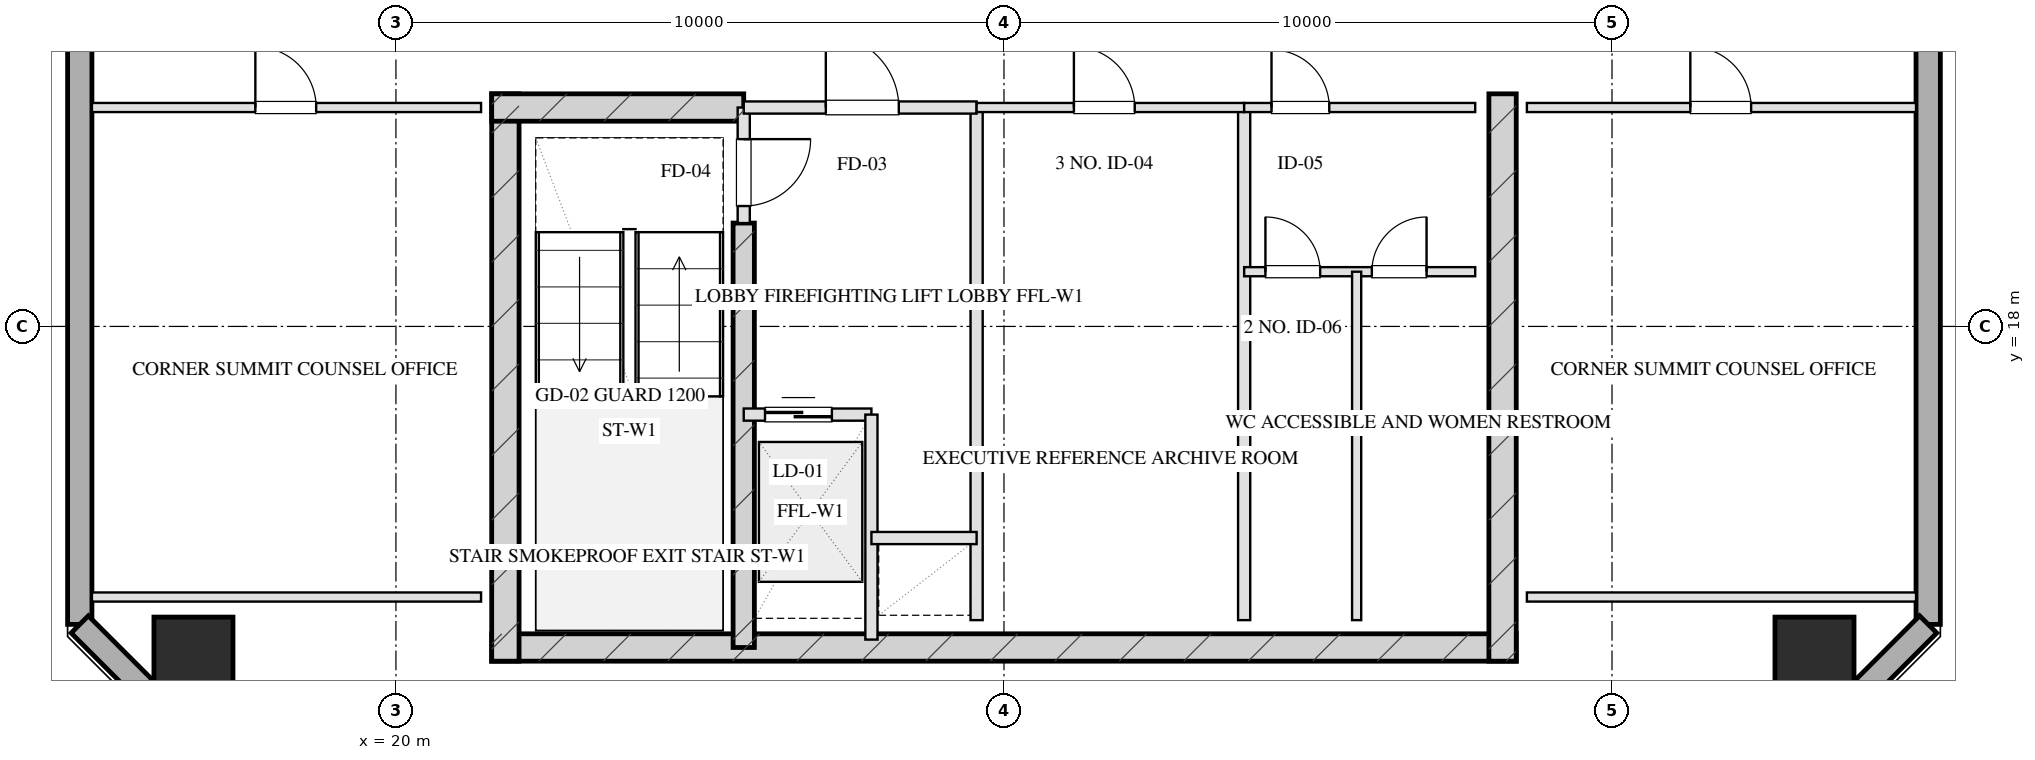
"""IFC4 building model, lengths in metres.
Left out: names, types, materials, properties, quantities, classifications, styles, units other than length and angle.
Written with IfcOpenShell. Run it as: python <this file> out.ifc"""

import sys

from ifc_helpers import new_model, si_unit, direction, frame, frame_2d, origin, origin_2d, place, context, subcontext, project, spatial, rectangle, hollow_rectangle, extrude, element, fill, save


model = new_model("IFC4")
c1 = context("Model", 3, precision=1e-05, world=origin(), true_north=direction((0.0, 1.0)))
c2 = subcontext(c1, "Body", "Model", "MODEL_VIEW")
j1 = project(units=[si_unit("LENGTHUNIT", "METRE"), si_unit("PLANEANGLEUNIT", "RADIAN")], contexts=[c1])
p1 = place(None, origin())
s1 = spatial("IfcSite", under=j1, at=p1, CompositionType="ELEMENT")
p2 = place(p1, origin())
s2 = spatial("IfcBuilding", under=s1, at=p2, CompositionType="ELEMENT")
p3 = place(p2, frame((0.0, 0.0, 263.2)))
s3 = spatial("IfcBuildingStorey", under=s2, at=p3, CompositionType="ELEMENT", Elevation=263.2)
p4 = place(p3, frame((21.575, 12.72, 0.0), z_axis=(0.0, 0.0, 1.0), x_axis=(1.0, 0.0, 0.0)))
e1 = element("IfcWall", 1, at=p4, inside=s3, PredefinedType="SHEAR", context=c2, shape_type="SweptSolid", body=[
    extrude(rectangle(XDim=16.85, YDim=0.45, at=frame_2d((8.425, 0.0))), origin(), (0.0, 0.0, 1.0), 3.2),
])
for number, where, z_axis, x_axis in (
    (2, (21.8, 21.825, 0.0), (0.0, 0.0, 1.0), (0.0, -1.0, 0.0)),
    (3, (38.2, 21.825, 0.0), (0.0, 0.0, 1.0), (0.0, -1.0, 0.0)),
):
    element("IfcWall", number, at=place(p3, frame(where, z_axis=z_axis, x_axis=x_axis)), inside=s3, PredefinedType="SHEAR", context=c2, shape_type="SweptSolid", body=[
        extrude(rectangle(XDim=9.33, YDim=0.45, at=frame_2d((4.665, 0.0))), origin(), (0.0, 0.0, 1.0), 3.2),
    ])
p5 = place(p3, frame((25.72, 19.7, 0.0), z_axis=(0.0, 0.0, 1.0), x_axis=(0.0, -1.0, 0.0)))
e4 = element("IfcWall", 4, at=p5, inside=s3, PredefinedType="SHEAR", context=c2, shape_type="SweptSolid", body=[
    extrude(rectangle(XDim=6.98, YDim=0.35, at=frame_2d((3.49, 0.0))), origin(), (0.0, 0.0, 1.0), 3.2),
])
p6 = place(p3, frame((21.575, 21.6, 0.0), z_axis=(0.0, 0.0, 1.0), x_axis=(1.0, 0.0, 0.0)))
e5 = element("IfcWall", 5, at=p6, inside=s3, PredefinedType="SHEAR", context=c2, shape_type="SweptSolid", body=[
    extrude(rectangle(XDim=4.145, YDim=0.45, at=frame_2d((2.073, 0.0))), origin(), (0.0, 0.0, 1.0), 3.2),
])
for number, where, z_axis, x_axis in (
    (6, (16.67, 12.57, 0.0), (0.0, 0.0, 1.0), (1.0, 0.0, 0.0)),
    (7, (43.33, 12.57, 0.0), (0.0, 0.0, 1.0), (1.0, 0.0, 0.0)),
):
    element("IfcColumn", number, at=place(p3, frame(where, z_axis=z_axis, x_axis=x_axis)), inside=s3, PredefinedType="COLUMN", context=c2, shape_type="SweptSolid", body=[
        extrude(hollow_rectangle(XDim=1.3, YDim=1.3, WallThickness=0.045, at=origin_2d()), origin(), (0.0, 0.0, 1.0), 3.201),
    ])
p7 = place(p3, frame((14.8, 13.1, 0.0), z_axis=(0.0, 0.0, 1.0), x_axis=(0.0, 1.0, 0.0)))
e8 = element("IfcWall", 8, at=p7, inside=s3, PredefinedType="SOLIDWALL", context=c2, shape_type="SweptSolid", body=[
    extrude(rectangle(XDim=41.8, YDim=0.4, at=frame_2d((20.9, 0.0))), origin(), (0.0, 0.0, 1.0), 2.36),
])
p8 = place(p7, frame((13.525, 0.0, 0.75)))
e9 = element("IfcOpeningElement", 9, at=p8, cuts=e8, PredefinedType="OPENING", context=c2, shape_type="SweptSolid", body=[
    extrude(rectangle(XDim=1.95, YDim=1.21, at=frame_2d((0.975, 0.605))), frame((0.0, 0.21, 0.0), z_axis=(0.0, -1.0, 0.0), x_axis=(1.0, 0.0, 0.0)), (0.0, 0.0, 1.0), 0.42),
])
p9 = place(p7, frame((17.325, 0.0, 0.75)))
e10 = element("IfcOpeningElement", 10, at=p9, cuts=e8, PredefinedType="OPENING", context=c2, shape_type="SweptSolid", body=[
    extrude(rectangle(XDim=1.95, YDim=1.21, at=frame_2d((0.975, 0.605))), frame((0.0, 0.21, 0.0), z_axis=(0.0, -1.0, 0.0), x_axis=(1.0, 0.0, 0.0)), (0.0, 0.0, 1.0), 0.42),
])
p10 = place(p7, frame((22.525, 0.0, 0.75)))
e11 = element("IfcOpeningElement", 11, at=p10, cuts=e8, PredefinedType="OPENING", context=c2, shape_type="SweptSolid", body=[
    extrude(rectangle(XDim=1.95, YDim=1.21, at=frame_2d((0.975, 0.605))), frame((0.0, 0.21, 0.0), z_axis=(0.0, -1.0, 0.0), x_axis=(1.0, 0.0, 0.0)), (0.0, 0.0, 1.0), 0.42),
])
p11 = place(p7, frame((26.325, 0.0, 0.75)))
e12 = element("IfcOpeningElement", 12, at=p11, cuts=e8, PredefinedType="OPENING", context=c2, shape_type="SweptSolid", body=[
    extrude(rectangle(XDim=1.95, YDim=1.21, at=frame_2d((0.975, 0.605))), frame((0.0, 0.21, 0.0), z_axis=(0.0, -1.0, 0.0), x_axis=(1.0, 0.0, 0.0)), (0.0, 0.0, 1.0), 0.42),
])
p12 = place(p3, frame((45.2, 54.9, 0.0), z_axis=(0.0, 0.0, 1.0), x_axis=(0.0, -1.0, 0.0)))
e13 = element("IfcWall", 13, at=p12, inside=s3, PredefinedType="SOLIDWALL", context=c2, shape_type="SweptSolid", body=[
    extrude(rectangle(XDim=41.8, YDim=0.4, at=frame_2d((20.9, 0.0))), origin(), (0.0, 0.0, 1.0), 2.36),
])
p13 = place(p12, frame((26.325, 0.0, 0.75)))
e14 = element("IfcOpeningElement", 14, at=p13, cuts=e13, PredefinedType="OPENING", context=c2, shape_type="SweptSolid", body=[
    extrude(rectangle(XDim=1.95, YDim=1.21, at=frame_2d((0.975, 0.605))), frame((0.0, 0.21, 0.0), z_axis=(0.0, -1.0, 0.0), x_axis=(1.0, 0.0, 0.0)), (0.0, 0.0, 1.0), 0.42),
])
p14 = place(p12, frame((22.525, 0.0, 0.75)))
e15 = element("IfcOpeningElement", 15, at=p14, cuts=e13, PredefinedType="OPENING", context=c2, shape_type="SweptSolid", body=[
    extrude(rectangle(XDim=1.95, YDim=1.21, at=frame_2d((0.975, 0.605))), frame((0.0, 0.21, 0.0), z_axis=(0.0, -1.0, 0.0), x_axis=(1.0, 0.0, 0.0)), (0.0, 0.0, 1.0), 0.42),
])
p15 = place(p12, frame((17.325, 0.0, 0.75)))
e16 = element("IfcOpeningElement", 16, at=p15, cuts=e13, PredefinedType="OPENING", context=c2, shape_type="SweptSolid", body=[
    extrude(rectangle(XDim=1.95, YDim=1.21, at=frame_2d((0.975, 0.605))), frame((0.0, 0.21, 0.0), z_axis=(0.0, -1.0, 0.0), x_axis=(1.0, 0.0, 0.0)), (0.0, 0.0, 1.0), 0.42),
])
p16 = place(p12, frame((13.525, 0.0, 0.75)))
e17 = element("IfcOpeningElement", 17, at=p16, cuts=e13, PredefinedType="OPENING", context=c2, shape_type="SweptSolid", body=[
    extrude(rectangle(XDim=1.95, YDim=1.21, at=frame_2d((0.975, 0.605))), frame((0.0, 0.21, 0.0), z_axis=(0.0, -1.0, 0.0), x_axis=(1.0, 0.0, 0.0)), (0.0, 0.0, 1.0), 0.42),
])
for number, where, z_axis, x_axis in (
    (18, (45.2, 13.1, 0.0), (0.0, 0.0, 1.0), (-0.707, -0.707, 0.0)),
    (19, (17.2, 10.7, 0.0), (0.0, 0.0, 1.0), (-0.707, 0.707, 0.0)),
):
    element("IfcWall", number, at=place(p3, frame(where, z_axis=z_axis, x_axis=x_axis)), inside=s3, PredefinedType="SOLIDWALL", context=c2, shape_type="SweptSolid", body=[
        extrude(rectangle(XDim=3.394, YDim=0.4, at=frame_2d((1.697, 0.0))), origin(), (0.0, 0.0, 1.0), 2.36),
    ])
p17 = place(p3, frame((25.72, 21.6, 0.0), z_axis=(0.0, 0.0, 1.0), x_axis=(0.0, -1.0, 0.0)))
e20 = element("IfcWall", 20, at=p17, inside=s3, PredefinedType="PARTITIONING", context=c2, shape_type="SweptSolid", body=[
    extrude(rectangle(XDim=1.9, YDim=0.2, at=frame_2d((0.95, 0.0))), origin(), (0.0, 0.0, 1.0), 2.925),
])
p18 = place(p17, frame((0.52, 0.0, 0.0)))
e21 = element("IfcOpeningElement", 21, at=p18, cuts=e20, PredefinedType="OPENING", context=c2, shape_type="SweptSolid", body=[
    extrude(rectangle(XDim=1.1, YDim=2.05, at=frame_2d((0.55, 1.025))), frame((0.0, 0.11, 0.0), z_axis=(0.0, -1.0, 0.0), x_axis=(1.0, 0.0, 0.0)), (0.0, 0.0, 1.0), 0.22),
])
p19 = place(p3, frame((29.55, 21.6, 0.0), z_axis=(0.0, 0.0, 1.0), x_axis=(0.0, -1.0, 0.0)))
e22 = element("IfcWall", 22, at=p19, inside=s3, PredefinedType="PARTITIONING", context=c2, shape_type="SweptSolid", body=[
    extrude(rectangle(XDim=8.43, YDim=0.2, at=frame_2d((4.215, 0.0))), origin(), (0.0, 0.0, 1.0), 2.925),
])
p20 = place(p3, frame((25.72, 21.6, 0.0), z_axis=(0.0, 0.0, 1.0), x_axis=(1.0, 0.0, 0.0)))
e23 = element("IfcWall", 23, at=p20, inside=s3, PredefinedType="PARTITIONING", context=c2, shape_type="SweptSolid", body=[
    extrude(rectangle(XDim=3.83, YDim=0.2, at=frame_2d((1.915, 0.0))), origin(), (0.0, 0.0, 1.0), 2.925),
])
p21 = place(p20, frame((1.35, 0.0, 0.0)))
e24 = element("IfcOpeningElement", 24, at=p21, cuts=e23, PredefinedType="OPENING", context=c2, shape_type="SweptSolid", body=[
    extrude(rectangle(XDim=1.2, YDim=2.05, at=frame_2d((0.6, 1.025))), frame((0.0, 0.11, 0.0), z_axis=(0.0, -1.0, 0.0), x_axis=(1.0, 0.0, 0.0)), (0.0, 0.0, 1.0), 0.22),
])
p22 = place(p3, frame((25.72, 16.55, 0.0), z_axis=(0.0, 0.0, 1.0), x_axis=(1.0, 0.0, 0.0)))
e25 = element("IfcWall", 25, at=p22, inside=s3, PredefinedType="PARTITIONING", context=c2, shape_type="SweptSolid", body=[
    extrude(rectangle(XDim=2.1, YDim=0.2, at=frame_2d((1.05, 0.0))), origin(), (0.0, 0.0, 1.0), 2.925),
])
p23 = place(p22, frame((0.35, 0.0, 0.0)))
e26 = element("IfcOpeningElement", 26, at=p23, cuts=e25, PredefinedType="OPENING", context=c2, shape_type="SweptSolid", body=[
    extrude(rectangle(XDim=1.1, YDim=2.05, at=frame_2d((0.55, 1.025))), frame((0.0, 0.11, 0.0), z_axis=(0.0, -1.0, 0.0), x_axis=(1.0, 0.0, 0.0)), (0.0, 0.0, 1.0), 0.22),
])
p24 = place(p3, frame((27.82, 16.55, 0.0), z_axis=(0.0, 0.0, 1.0), x_axis=(0.0, -1.0, 0.0)))
e27 = element("IfcWall", 27, at=p24, inside=s3, PredefinedType="PARTITIONING", context=c2, shape_type="SweptSolid", body=[
    extrude(rectangle(XDim=3.7, YDim=0.2, at=frame_2d((1.85, 0.0))), origin(), (0.0, 0.0, 1.0), 2.925),
])
p25 = place(p3, frame((27.82, 14.52, 0.0), z_axis=(0.0, 0.0, 1.0), x_axis=(1.0, 0.0, 0.0)))
e28 = element("IfcWall", 28, at=p25, inside=s3, PredefinedType="PARTITIONING", context=c2, shape_type="SweptSolid", body=[
    extrude(rectangle(XDim=1.73, YDim=0.2, at=frame_2d((0.865, 0.0))), origin(), (0.0, 0.0, 1.0), 2.925),
])
p26 = place(p3, frame((33.95, 21.6, 0.0), z_axis=(0.0, 0.0, 1.0), x_axis=(0.0, -1.0, 0.0)))
e29 = element("IfcWall", 29, at=p26, inside=s3, PredefinedType="PARTITIONING", context=c2, shape_type="SweptSolid", body=[
    extrude(rectangle(XDim=8.43, YDim=0.2, at=frame_2d((4.215, 0.0))), origin(), (0.0, 0.0, 1.0), 2.925),
])
p27 = place(p3, frame((29.55, 21.6, 0.0), z_axis=(0.0, 0.0, 1.0), x_axis=(1.0, 0.0, 0.0)))
e30 = element("IfcWall", 30, at=p27, inside=s3, PredefinedType="PARTITIONING", context=c2, shape_type="SweptSolid", body=[
    extrude(rectangle(XDim=4.4, YDim=0.15, at=frame_2d((2.2, 0.0))), origin(), (0.0, 0.0, 1.0), 2.925),
])
p28 = place(p27, frame((1.6, 0.0, 0.0)))
e31 = element("IfcOpeningElement", 31, at=p28, cuts=e30, PredefinedType="OPENING", context=c2, shape_type="SweptSolid", body=[
    extrude(rectangle(XDim=1.0, YDim=2.05, at=frame_2d((0.5, 1.025))), frame((0.0, 0.085, 0.0), z_axis=(0.0, -1.0, 0.0), x_axis=(1.0, 0.0, 0.0)), (0.0, 0.0, 1.0), 0.17),
])
p29 = place(p3, frame((33.95, 21.6, 0.0), z_axis=(0.0, 0.0, 1.0), x_axis=(1.0, 0.0, 0.0)))
e32 = element("IfcWall", 32, at=p29, inside=s3, PredefinedType="PARTITIONING", context=c2, shape_type="SweptSolid", body=[
    extrude(rectangle(XDim=3.8, YDim=0.15, at=frame_2d((1.9, 0.0))), origin(), (0.0, 0.0, 1.0), 2.925),
])
p30 = place(p29, frame((0.45, 0.0, 0.0)))
e33 = element("IfcOpeningElement", 33, at=p30, cuts=e32, PredefinedType="OPENING", context=c2, shape_type="SweptSolid", body=[
    extrude(rectangle(XDim=0.95, YDim=2.05, at=frame_2d((0.475, 1.025))), frame((0.0, 0.085, 0.0), z_axis=(0.0, -1.0, 0.0), x_axis=(1.0, 0.0, 0.0)), (0.0, 0.0, 1.0), 0.17),
])
p31 = place(p3, frame((33.95, 18.9, 0.0), z_axis=(0.0, 0.0, 1.0), x_axis=(1.0, 0.0, 0.0)))
e34 = element("IfcWall", 34, at=p31, inside=s3, PredefinedType="PARTITIONING", context=c2, shape_type="SweptSolid", body=[
    extrude(rectangle(XDim=3.8, YDim=0.15, at=frame_2d((1.9, 0.0))), origin(), (0.0, 0.0, 1.0), 2.925),
])
p32 = place(p31, frame((0.35, 0.0, 0.0)))
e35 = element("IfcOpeningElement", 35, at=p32, cuts=e34, PredefinedType="OPENING", context=c2, shape_type="SweptSolid", body=[
    extrude(rectangle(XDim=0.9, YDim=2.05, at=frame_2d((0.45, 1.025))), frame((0.0, 0.085, 0.0), z_axis=(0.0, -1.0, 0.0), x_axis=(1.0, 0.0, 0.0)), (0.0, 0.0, 1.0), 0.17),
])
p33 = place(p31, frame((2.1, 0.0, 0.0)))
e36 = element("IfcOpeningElement", 36, at=p33, cuts=e34, PredefinedType="OPENING", context=c2, shape_type="SweptSolid", body=[
    extrude(rectangle(XDim=0.9, YDim=2.05, at=frame_2d((0.45, 1.025))), frame((0.0, 0.085, 0.0), z_axis=(0.0, -1.0, 0.0), x_axis=(1.0, 0.0, 0.0)), (0.0, 0.0, 1.0), 0.17),
])
p34 = place(p3, frame((35.8, 18.9, 0.0), z_axis=(0.0, 0.0, 1.0), x_axis=(0.0, -1.0, 0.0)))
e37 = element("IfcWall", 37, at=p34, inside=s3, PredefinedType="PARTITIONING", context=c2, shape_type="SweptSolid", body=[
    extrude(rectangle(XDim=5.73, YDim=0.15, at=frame_2d((2.865, 0.0))), origin(), (0.0, 0.0, 1.0), 2.925),
])
p35 = place(p3, frame((15.0, 13.55, 0.0), z_axis=(0.0, 0.0, 1.0), x_axis=(1.0, 0.0, 0.0)))
e38 = element("IfcWall", 38, at=p35, inside=s3, PredefinedType="PARTITIONING", context=c2, shape_type="SweptSolid", body=[
    extrude(rectangle(XDim=6.4, YDim=0.15, at=frame_2d((3.2, 0.0))), origin(), (0.0, 0.0, 1.0), 2.925),
])
p36 = place(p3, frame((15.0, 21.6, 0.0), z_axis=(0.0, 0.0, 1.0), x_axis=(1.0, 0.0, 0.0)))
e39 = element("IfcWall", 39, at=p36, inside=s3, PredefinedType="PARTITIONING", context=c2, shape_type="SweptSolid", body=[
    extrude(rectangle(XDim=6.4, YDim=0.15, at=frame_2d((3.2, 0.0))), origin(), (0.0, 0.0, 1.0), 2.925),
])
p37 = place(p36, frame((2.688, 0.0, 0.0)))
e40 = element("IfcOpeningElement", 40, at=p37, cuts=e39, PredefinedType="OPENING", context=c2, shape_type="SweptSolid", body=[
    extrude(rectangle(XDim=1.0, YDim=2.05, at=frame_2d((0.5, 1.025))), frame((0.0, 0.085, 0.0), z_axis=(0.0, -1.0, 0.0), x_axis=(1.0, 0.0, 0.0)), (0.0, 0.0, 1.0), 0.17),
])
p38 = place(p3, frame((38.6, 13.55, 0.0), z_axis=(0.0, 0.0, 1.0), x_axis=(1.0, 0.0, 0.0)))
e41 = element("IfcWall", 41, at=p38, inside=s3, PredefinedType="PARTITIONING", context=c2, shape_type="SweptSolid", body=[
    extrude(rectangle(XDim=6.4, YDim=0.15, at=frame_2d((3.2, 0.0))), origin(), (0.0, 0.0, 1.0), 2.925),
])
p39 = place(p3, frame((38.6, 21.6, 0.0), z_axis=(0.0, 0.0, 1.0), x_axis=(1.0, 0.0, 0.0)))
e42 = element("IfcWall", 42, at=p39, inside=s3, PredefinedType="PARTITIONING", context=c2, shape_type="SweptSolid", body=[
    extrude(rectangle(XDim=6.4, YDim=0.15, at=frame_2d((3.2, 0.0))), origin(), (0.0, 0.0, 1.0), 2.925),
])
p40 = place(p39, frame((2.688, 0.0, 0.0)))
e43 = element("IfcOpeningElement", 43, at=p40, cuts=e42, PredefinedType="OPENING", context=c2, shape_type="SweptSolid", body=[
    extrude(rectangle(XDim=1.0, YDim=2.05, at=frame_2d((0.5, 1.025))), frame((0.0, 0.085, 0.0), z_axis=(0.0, -1.0, 0.0), x_axis=(1.0, 0.0, 0.0)), (0.0, 0.0, 1.0), 0.17),
])
p41 = place(p18, origin())
e44 = element("IfcDoor", 44, at=p41, inside=s3, OperationType="SINGLE_SWING_LEFT", PredefinedType="DOOR", context=c2, shape_type="SweptSolid", body=[
    extrude(rectangle(XDim=1.1, YDim=2.05, at=frame_2d((0.55, 1.025))), frame((0.0, 0.025, 0.0), z_axis=(0.0, -1.0, 0.0), x_axis=(1.0, 0.0, 0.0)), (0.0, 0.0, 1.0), 0.05),
])
fill(e21, e44)
p42 = place(p21, origin())
e45 = element("IfcDoor", 45, at=p42, inside=s3, OperationType="SINGLE_SWING_LEFT", PredefinedType="DOOR", context=c2, shape_type="SweptSolid", body=[
    extrude(rectangle(XDim=1.2, YDim=2.05, at=frame_2d((0.6, 1.025))), frame((0.0, 0.025, 0.0), z_axis=(0.0, -1.0, 0.0), x_axis=(1.0, 0.0, 0.0)), (0.0, 0.0, 1.0), 0.05),
])
fill(e24, e45)
p43 = place(p23, origin())
e46 = element("IfcDoor", 46, at=p43, inside=s3, OperationType="DOUBLE_DOOR_SLIDING", PredefinedType="DOOR", context=c2, shape_type="SweptSolid", body=[
    extrude(rectangle(XDim=1.1, YDim=2.05, at=frame_2d((0.55, 1.025))), frame((0.0, 0.025, 0.0), z_axis=(0.0, -1.0, 0.0), x_axis=(1.0, 0.0, 0.0)), (0.0, 0.0, 1.0), 0.05),
])
fill(e26, e46)
p44 = place(p28, origin())
e47 = element("IfcDoor", 47, at=p44, inside=s3, OperationType="SINGLE_SWING_LEFT", PredefinedType="DOOR", context=c2, shape_type="SweptSolid", body=[
    extrude(rectangle(XDim=1.0, YDim=2.05, at=frame_2d((0.5, 1.025))), frame((0.0, 0.025, 0.0), z_axis=(0.0, -1.0, 0.0), x_axis=(1.0, 0.0, 0.0)), (0.0, 0.0, 1.0), 0.05),
])
fill(e31, e47)
p45 = place(p30, origin())
e48 = element("IfcDoor", 48, at=p45, inside=s3, OperationType="SINGLE_SWING_LEFT", PredefinedType="DOOR", context=c2, shape_type="SweptSolid", body=[
    extrude(rectangle(XDim=0.95, YDim=2.05, at=frame_2d((0.475, 1.025))), frame((0.0, 0.025, 0.0), z_axis=(0.0, -1.0, 0.0), x_axis=(1.0, 0.0, 0.0)), (0.0, 0.0, 1.0), 0.05),
])
fill(e33, e48)
p46 = place(p32, origin())
e49 = element("IfcDoor", 49, at=p46, inside=s3, OperationType="SINGLE_SWING_LEFT", PredefinedType="DOOR", context=c2, shape_type="SweptSolid", body=[
    extrude(rectangle(XDim=0.9, YDim=2.05, at=frame_2d((0.45, 1.025))), frame((0.0, 0.025, 0.0), z_axis=(0.0, -1.0, 0.0), x_axis=(1.0, 0.0, 0.0)), (0.0, 0.0, 1.0), 0.05),
])
fill(e35, e49)
p47 = place(p33, origin())
e50 = element("IfcDoor", 50, at=p47, inside=s3, OperationType="SINGLE_SWING_RIGHT", PredefinedType="DOOR", context=c2, shape_type="SweptSolid", body=[
    extrude(rectangle(XDim=0.9, YDim=2.05, at=frame_2d((0.45, 1.025))), frame((0.0, 0.025, 0.0), z_axis=(0.0, -1.0, 0.0), x_axis=(1.0, 0.0, 0.0)), (0.0, 0.0, 1.0), 0.05),
])
fill(e36, e50)
p48 = place(p37, origin())
e51 = element("IfcDoor", 51, at=p48, inside=s3, OperationType="SINGLE_SWING_LEFT", PredefinedType="DOOR", context=c2, shape_type="SweptSolid", body=[
    extrude(rectangle(XDim=1.0, YDim=2.05, at=frame_2d((0.5, 1.025))), frame((0.0, 0.025, 0.0), z_axis=(0.0, -1.0, 0.0), x_axis=(1.0, 0.0, 0.0)), (0.0, 0.0, 1.0), 0.05),
])
fill(e40, e51)
p49 = place(p40, origin())
e52 = element("IfcDoor", 52, at=p49, inside=s3, OperationType="SINGLE_SWING_LEFT", PredefinedType="DOOR", context=c2, shape_type="SweptSolid", body=[
    extrude(rectangle(XDim=1.0, YDim=2.05, at=frame_2d((0.5, 1.025))), frame((0.0, 0.025, 0.0), z_axis=(0.0, -1.0, 0.0), x_axis=(1.0, 0.0, 0.0)), (0.0, 0.0, 1.0), 0.05),
])
fill(e43, e52)
save(model, sys.argv[1])
